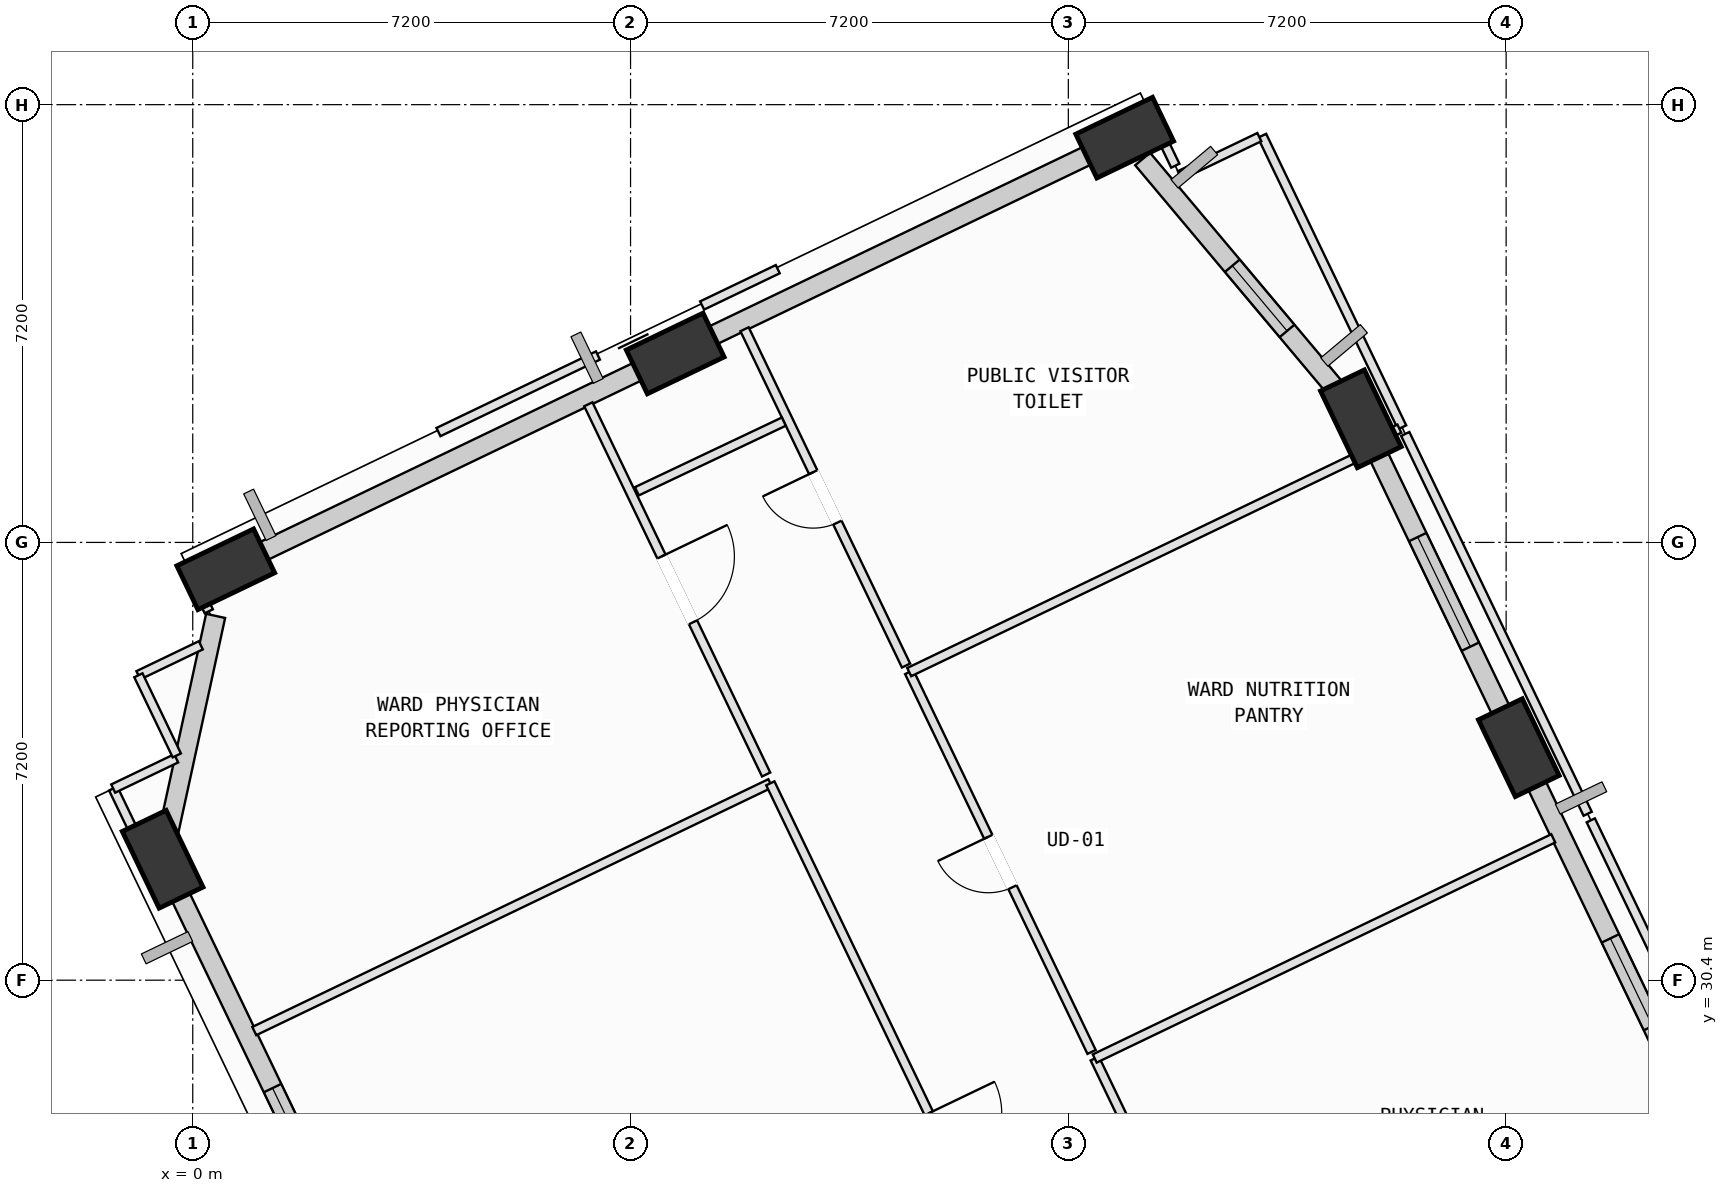
"""IFC4 building model, lengths in metres.
Left out: names, types, materials, properties, quantities, classifications, styles, units other than length and angle.
Written with IfcOpenShell. Run it as: python <this file> out.ifc"""

import sys

from ifc_helpers import new_model, si_unit, direction, frame, frame_2d, origin, origin_2d, place, context, subcontext, project, spatial, rectangle, extrude, element, fill, save


model = new_model("IFC4")
c1 = context("Model", 3, precision=1e-05, world=origin(), true_north=direction((0.0, 1.0)))
c2 = subcontext(c1, "Body", "Model", "MODEL_VIEW")
j1 = project(units=[si_unit("LENGTHUNIT", "METRE"), si_unit("PLANEANGLEUNIT", "RADIAN")], contexts=[c1])
p1 = place(None, origin())
s1 = spatial("IfcSite", under=j1, at=p1, CompositionType="ELEMENT")
p2 = place(p1, origin())
s2 = spatial("IfcBuilding", under=s1, at=p2, CompositionType="ELEMENT")
p3 = place(p2, frame((0.0, 0.0, 132.4)))
s3 = spatial("IfcBuildingStorey", under=s2, at=p3, CompositionType="ELEMENT", Elevation=132.4)
p4 = place(p3, frame((21.808, 34.224, 0.002), z_axis=(-0.038595202301, -0.049082366275, 0.998048762176), x_axis=(0.215850292416, 0.974802805821, 0.056286241908)))
e1 = element("IfcColumn", 1, at=p4, inside=s3, PredefinedType="COLUMN", context=c2, shape_type="SweptSolid", body=[
    extrude(rectangle(XDim=1.4, YDim=0.8, at=origin_2d()), origin(), (0.0, 0.0, 1.0), 4.004),
])
p5 = place(p3, frame((19.211, 39.633, 0.002), z_axis=(-0.060746648764, -0.059894491367, 0.996354602824), x_axis=(0.335654000459, 0.938841059949, 0.076901600308)))
e2 = element("IfcColumn", 2, at=p5, inside=s3, PredefinedType="COLUMN", context=c2, shape_type="SweptSolid", body=[
    extrude(rectangle(XDim=1.4, YDim=0.8, at=origin_2d()), origin(), (0.0, 0.0, 1.0), 4.011),
])
p6 = place(p3, frame((15.326, 44.257, 0.002), z_axis=(-0.079483443624, -0.075961640928, 0.99393773009), x_axis=(0.933868017477, -0.354436922656, 0.047591950922)))
e3 = element("IfcColumn", 3, at=p6, inside=s3, PredefinedType="COLUMN", context=c2, shape_type="SweptSolid", body=[
    extrude(rectangle(XDim=1.4, YDim=0.8, at=origin_2d()), origin(), (0.0, 0.0, 1.0), 4.021),
])
p7 = place(p3, frame((7.935, 40.708, 0.002), z_axis=(-0.064557977636, -0.106141801729, 0.992253085382), x_axis=(0.993383828706, -0.101472169552, 0.053777018064)))
e4 = element("IfcColumn", 4, at=p7, inside=s3, PredefinedType="COLUMN", context=c2, shape_type="SweptSolid", body=[
    extrude(rectangle(XDim=1.4, YDim=0.8, at=origin_2d()), origin(), (0.0, 0.0, 1.0), 4.028),
])
p8 = place(p3, frame((0.543, 37.158, 0.002), z_axis=(-0.049567049354, -0.136007147619, 0.98946711083), x_axis=(0.993621795809, 0.093750933041, 0.06266170639)))
e5 = element("IfcColumn", 5, at=p8, inside=s3, PredefinedType="COLUMN", context=c2, shape_type="SweptSolid", body=[
    extrude(rectangle(XDim=1.4, YDim=0.8, at=origin_2d()), origin(), (0.0, 0.0, 1.0), 4.039),
])
p9 = place(p3, frame((-0.495, 32.389, 0.002), z_axis=(-0.029927956764, -0.14014748238, 0.989678230834), x_axis=(-0.237013372869, 0.962878942205, 0.129185152939)))
e6 = element("IfcColumn", 6, at=p9, inside=s3, PredefinedType="COLUMN", context=c2, shape_type="SweptSolid", body=[
    extrude(rectangle(XDim=1.4, YDim=0.8, at=origin_2d()), origin(), (0.0, 0.0, 1.0), 4.038),
])
p10 = place(p3, frame((22.042, 33.739, 0.0), z_axis=(0.0, 0.0, 1.0), x_axis=(0.432859884789, -0.901461213886, 0.0)))
e7 = element("IfcWall", 7, at=p10, inside=s3, PredefinedType="SOLIDWALL", context=c2, shape_type="SweptSolid", body=[
    extrude(rectangle(XDim=6.223, YDim=0.32, at=frame_2d((3.111, 0.0))), origin(), (0.0, 0.0, 1.0), 3.165),
])
p11 = place(p10, frame((2.941, 0.0, 0.75)))
e8 = element("IfcOpeningElement", 8, at=p11, cuts=e7, PredefinedType="OPENING", context=c2, shape_type="SweptSolid", body=[
    extrude(rectangle(XDim=1.6, YDim=1.95, at=frame_2d((0.8, 0.975))), frame((0.0, 0.17, 0.0), z_axis=(0.0, -1.0, 0.0), x_axis=(1.0, 0.0, 0.0)), (0.0, 0.0, 1.0), 0.34),
])
p12 = place(p3, frame((19.438, 39.16, 0.0), z_axis=(0.0, 0.0, 1.0), x_axis=(0.432877308879, -0.901452847052, 0.0)))
e9 = element("IfcWall", 9, at=p12, inside=s3, PredefinedType="SOLIDWALL", context=c2, shape_type="SweptSolid", body=[
    extrude(rectangle(XDim=5.047, YDim=0.32, at=frame_2d((2.523, 0.0))), origin(), (0.0, 0.0, 1.0), 3.165),
])
p13 = place(p12, frame((1.633, 0.0, 0.75)))
e10 = element("IfcOpeningElement", 10, at=p13, cuts=e9, PredefinedType="OPENING", context=c2, shape_type="SweptSolid", body=[
    extrude(rectangle(XDim=2.0, YDim=1.95, at=frame_2d((1.0, 0.975))), frame((0.0, 0.17, 0.0), z_axis=(0.0, -1.0, 0.0), x_axis=(1.0, 0.0, 0.0)), (0.0, 0.0, 1.0), 0.34),
])
p14 = place(p3, frame((15.622, 43.906, 0.0), z_axis=(0.0, 0.0, 1.0), x_axis=(0.64320883209, -0.765690798117, 0.0)))
e11 = element("IfcWall", 11, at=p14, inside=s3, PredefinedType="SOLIDWALL", context=c2, shape_type="SweptSolid", body=[
    extrude(rectangle(XDim=5.129, YDim=0.32, at=frame_2d((2.564, 0.0))), origin(), (0.0, 0.0, 1.0), 3.165),
])
p15 = place(p14, frame((2.293, 0.0, 0.75)))
e12 = element("IfcOpeningElement", 12, at=p15, cuts=e11, PredefinedType="OPENING", context=c2, shape_type="SweptSolid", body=[
    extrude(rectangle(XDim=1.4, YDim=1.85, at=frame_2d((0.7, 0.925))), frame((0.0, 0.17, 0.0), z_axis=(0.0, -1.0, 0.0), x_axis=(1.0, 0.0, 0.0)), (0.0, 0.0, 1.0), 0.34),
])
p16 = place(p3, frame((8.176, 40.823, 0.0), z_axis=(0.0, 0.0, 1.0), x_axis=(0.901450863986, 0.432881438524, 0.0)))
e13 = element("IfcWall", 13, at=p16, inside=s3, PredefinedType="SOLIDWALL", context=c2, shape_type="SweptSolid", body=[
    extrude(rectangle(XDim=7.231, YDim=0.32, at=frame_2d((3.615, 0.0))), origin(), (0.0, 0.0, 1.0), 3.165),
])
p17 = place(p3, frame((0.762, 37.263, 0.0), z_axis=(0.0, 0.0, 1.0), x_axis=(0.901459116329, 0.432864253072, 0.0)))
e14 = element("IfcWall", 14, at=p17, inside=s3, PredefinedType="SOLIDWALL", context=c2, shape_type="SweptSolid", body=[
    extrude(rectangle(XDim=7.27, YDim=0.32, at=frame_2d((3.635, 0.0))), origin(), (0.0, 0.0, 1.0), 3.165),
])
p18 = place(p3, frame((-0.451, 32.591, 0.0), z_axis=(0.0, 0.0, 1.0), x_axis=(0.212661566616, 0.977125917211, 0.0)))
e15 = element("IfcWall", 15, at=p18, inside=s3, PredefinedType="SOLIDWALL", context=c2, shape_type="SweptSolid", body=[
    extrude(rectangle(XDim=3.889, YDim=0.32, at=frame_2d((1.945, 0.0))), origin(), (0.0, 0.0, 1.0), 3.165),
])
p19 = place(p3, frame((2.167, 26.847, 0.0), z_axis=(0.0, 0.0, 1.0), x_axis=(-0.432891082479, 0.901446232845, 0.0)))
e16 = element("IfcWall", 16, at=p19, inside=s3, PredefinedType="SOLIDWALL", context=c2, shape_type="SweptSolid", body=[
    extrude(rectangle(XDim=5.456, YDim=0.32, at=frame_2d((2.728, 0.0))), origin(), (0.0, 0.0, 1.0), 3.165),
])
p20 = place(p19, frame((0.773, 0.0, 0.75)))
e17 = element("IfcOpeningElement", 17, at=p20, cuts=e16, PredefinedType="OPENING", context=c2, shape_type="SweptSolid", body=[
    extrude(rectangle(XDim=1.2, YDim=1.75, at=frame_2d((0.6, 0.875))), frame((0.0, 0.17, 0.0), z_axis=(0.0, -1.0, 0.0), x_axis=(1.0, 0.0, 0.0)), (0.0, 0.0, 1.0), 0.34),
])
p21 = place(p3, frame((1.012, 29.563, 0.0), z_axis=(0.0, 0.0, 1.0), x_axis=(0.901474897233, 0.432831387099, 0.0)))
e18 = element("IfcWall", 18, at=p21, inside=s3, PredefinedType="PARTITIONING", context=c2, shape_type="SweptSolid", body=[
    extrude(rectangle(XDim=9.415, YDim=0.15, at=frame_2d((4.707, 0.0))), origin(), (0.0, 0.0, 1.0), 3.78),
])
p22 = place(p3, frame((9.499, 33.638, 0.0), z_axis=(0.0, 0.0, 1.0), x_axis=(0.432861750003, -0.901460318253, 0.0)))
e19 = element("IfcWall", 19, at=p22, inside=s3, PredefinedType="PARTITIONING", context=c2, shape_type="SweptSolid", body=[
    extrude(rectangle(XDim=13.24, YDim=0.15, at=frame_2d((6.62, 0.0))), origin(), (0.0, 0.0, 1.0), 2.965),
])
p23 = place(p22, frame((6.02, 0.0, 0.0)))
e20 = element("IfcOpeningElement", 20, at=p23, cuts=e19, PredefinedType="OPENING", context=c2, shape_type="SweptSolid", body=[
    extrude(rectangle(XDim=1.2, YDim=2.15, at=frame_2d((0.6, 1.075))), frame((0.0, 0.085, 0.0), z_axis=(0.0, -1.0, 0.0), x_axis=(1.0, 0.0, 0.0)), (0.0, 0.0, 1.0), 0.17),
])
p24 = place(p3, frame((-0.894, 35.415, 0.0), z_axis=(0.0, 0.0, 1.0), x_axis=(0.901553151805, 0.432668365461, 0.0)))
e21 = element("IfcWall", 21, at=p24, inside=s3, PredefinedType="PARTITIONING", context=c2, shape_type="SweptSolid", body=[
    extrude(rectangle(XDim=1.139, YDim=0.15, at=frame_2d((0.57, 0.0))), origin(), (0.0, 0.0, 1.0), 3.78),
])
p25 = place(p3, frame((0.264, 36.467, 0.0), z_axis=(0.0, 0.0, 1.0), x_axis=(-0.432919972464, 0.901432358772, 0.0)))
e22 = element("IfcWall", 22, at=p25, inside=s3, PredefinedType="PARTITIONING", context=c2, shape_type="SweptSolid", body=[
    extrude(rectangle(XDim=0.672, YDim=0.15, at=frame_2d((0.336, 0.0))), origin(), (0.0, 0.0, 1.0), 2.965),
])
p26 = place(p3, frame((-0.027, 37.073, 0.0), z_axis=(0.0, 0.0, 1.0), x_axis=(0.901633510565, 0.432500881647, 0.0)))
e23 = element("IfcWall", 23, at=p26, inside=s3, PredefinedType="PARTITIONING", context=c2, shape_type="SweptSolid", body=[
    extrude(rectangle(XDim=0.793, YDim=0.15, at=frame_2d((0.396, 0.0))), origin(), (0.0, 0.0, 1.0), 3.78),
])
p27 = place(p3, frame((6.506, 39.872, 0.0), z_axis=(0.0, 0.0, 1.0), x_axis=(0.432857966053, -0.901462135214, 0.0)))
e24 = element("IfcWall", 24, at=p27, inside=s3, PredefinedType="PARTITIONING", context=c2, shape_type="SweptSolid", body=[
    extrude(rectangle(XDim=6.755, YDim=0.15, at=frame_2d((3.377, 0.0))), origin(), (0.0, 0.0, 1.0), 2.965),
])
p28 = place(p27, frame((2.777, 0.0, 0.0)))
e25 = element("IfcOpeningElement", 25, at=p28, cuts=e24, PredefinedType="OPENING", context=c2, shape_type="SweptSolid", body=[
    extrude(rectangle(XDim=1.2, YDim=2.15, at=frame_2d((0.6, 1.075))), frame((0.0, 0.085, 0.0), z_axis=(0.0, -1.0, 0.0), x_axis=(1.0, 0.0, 0.0)), (0.0, 0.0, 1.0), 0.17),
])
p29 = place(p3, frame((-0.402, 31.665, 0.0), z_axis=(0.0, 0.0, 1.0), x_axis=(-0.432833442947, 0.901473910142, 0.0)))
e26 = element("IfcWall", 26, at=p29, inside=s3, PredefinedType="PARTITIONING", context=c2, shape_type="SweptSolid", body=[
    extrude(rectangle(XDim=2.093, YDim=0.15, at=frame_2d((1.047, 0.0))), origin(), (0.0, 0.0, 1.0), 3.165),
])
p30 = place(p3, frame((-1.308, 33.552, 0.0), z_axis=(0.0, 0.0, 1.0), x_axis=(0.901615860476, 0.432537674819, 0.0)))
e27 = element("IfcWall", 27, at=p30, inside=s3, PredefinedType="PARTITIONING", context=c2, shape_type="SweptSolid", body=[
    extrude(rectangle(XDim=1.149, YDim=0.15, at=frame_2d((0.575, 0.0))), origin(), (0.0, 0.0, 1.0), 3.78),
])
p31 = place(p3, frame((-0.262, 34.097, 0.0), z_axis=(0.0, 0.0, 1.0), x_axis=(-0.432388980773, 0.901687179295, 0.0)))
e28 = element("IfcWall", 28, at=p31, inside=s3, PredefinedType="PARTITIONING", context=c2, shape_type="SweptSolid", body=[
    extrude(rectangle(XDim=1.462, YDim=0.15, at=frame_2d((0.731, 0.0))), origin(), (0.0, 0.0, 1.0), 3.78),
])
p32 = place(p3, frame((18.931, 20.58, 0.0), z_axis=(0.0, 0.0, 1.0), x_axis=(-0.43286607563, 0.901458241168, 0.0)))
e29 = element("IfcWall", 29, at=p32, inside=s3, PredefinedType="PARTITIONING", context=c2, shape_type="SweptSolid", body=[
    extrude(rectangle(XDim=9.465, YDim=0.15, at=frame_2d((4.732, 0.0))), origin(), (0.0, 0.0, 1.0), 3.78),
])
p33 = place(p32, frame((4.132, 0.0, 0.0)))
e30 = element("IfcOpeningElement", 30, at=p33, cuts=e29, PredefinedType="OPENING", context=c2, shape_type="SweptSolid", body=[
    extrude(rectangle(XDim=1.2, YDim=2.15, at=frame_2d((0.6, 1.075))), frame((0.0, 0.085, 0.0), z_axis=(0.0, -1.0, 0.0), x_axis=(1.0, 0.0, 0.0)), (0.0, 0.0, 1.0), 0.17),
])
p34 = place(p3, frame((14.834, 29.112, 0.0), z_axis=(0.0, 0.0, 1.0), x_axis=(0.901468854951, 0.432843971373, 0.0)))
e31 = element("IfcWall", 31, at=p34, inside=s3, PredefinedType="PARTITIONING", context=c2, shape_type="SweptSolid", body=[
    extrude(rectangle(XDim=8.365, YDim=0.15, at=frame_2d((4.183, 0.0))), origin(), (0.0, 0.0, 1.0), 3.78),
])
p35 = place(p3, frame((22.992, 33.029, 0.0), z_axis=(0.0, 0.0, 1.0), x_axis=(0.432914217611, -0.901435122563, 0.0)))
e32 = element("IfcWall", 32, at=p35, inside=s3, PredefinedType="PARTITIONING", context=c2, shape_type="SweptSolid", body=[
    extrude(rectangle(XDim=9.75, YDim=0.15, at=frame_2d((4.875, 0.0))), origin(), (0.0, 0.0, 1.0), 3.78),
])
p36 = place(p3, frame((14.782, 29.22, 0.0), z_axis=(0.0, 0.0, 1.0), x_axis=(-0.432781462807, 0.901498866029, 0.0)))
e33 = element("IfcWall", 33, at=p36, inside=s3, PredefinedType="PARTITIONING", context=c2, shape_type="SweptSolid", body=[
    extrude(rectangle(XDim=6.93, YDim=0.15, at=frame_2d((3.465, 0.0))), origin(), (0.0, 0.0, 1.0), 3.78),
])
p37 = place(p36, frame((3.005, 0.0, 0.0)))
e34 = element("IfcOpeningElement", 34, at=p37, cuts=e33, PredefinedType="OPENING", context=c2, shape_type="SweptSolid", body=[
    extrude(rectangle(XDim=0.92, YDim=2.1, at=frame_2d((0.46, 1.05))), frame((0.0, 0.085, 0.0), z_axis=(0.0, -1.0, 0.0), x_axis=(1.0, 0.0, 0.0)), (0.0, 0.0, 1.0), 0.17),
])
p38 = place(p3, frame((11.783, 35.467, 0.0), z_axis=(0.0, 0.0, 1.0), x_axis=(0.901492537069, 0.432794646002, 0.0)))
e35 = element("IfcWall", 35, at=p38, inside=s3, PredefinedType="PARTITIONING", context=c2, shape_type="SweptSolid", body=[
    extrude(rectangle(XDim=8.364, YDim=0.15, at=frame_2d((4.182, 0.0))), origin(), (0.0, 0.0, 1.0), 3.78),
])
p39 = place(p3, frame((19.941, 39.384, 0.0), z_axis=(0.0, 0.0, 1.0), x_axis=(0.432895982314, -0.901443879838, 0.0)))
e36 = element("IfcWall", 36, at=p39, inside=s3, PredefinedType="PARTITIONING", context=c2, shape_type="SweptSolid", body=[
    extrude(rectangle(XDim=6.93, YDim=0.15, at=frame_2d((3.465, 0.0))), origin(), (0.0, 0.0, 1.0), 3.78),
])
p40 = place(p3, frame((17.586, 44.288, 0.0), z_axis=(0.0, 0.0, 1.0), x_axis=(0.432929498671, -0.901427783674, 0.0)))
e37 = element("IfcWall", 37, at=p40, inside=s3, PredefinedType="PARTITIONING", context=c2, shape_type="SweptSolid", body=[
    extrude(rectangle(XDim=5.32, YDim=0.15, at=frame_2d((2.66, 0.0))), origin(), (0.0, 0.0, 1.0), 3.78),
])
p41 = place(p3, frame((19.844, 39.471, 0.0), z_axis=(0.0, 0.0, 1.0), x_axis=(-0.902501800541, -0.430686080597, 0.0)))
e38 = element("IfcWall", 38, at=p41, inside=s3, PredefinedType="PARTITIONING", context=c2, shape_type="SweptSolid", body=[
    extrude(rectangle(XDim=0.416, YDim=0.15, at=frame_2d((0.208, 0.0))), origin(), (0.0, 0.0, 1.0), 3.78),
])
p42 = place(p3, frame((11.731, 35.575, 0.0), z_axis=(0.0, 0.0, 1.0), x_axis=(-0.432879822963, 0.901451639785, 0.0)))
e39 = element("IfcWall", 39, at=p42, inside=s3, PredefinedType="PARTITIONING", context=c2, shape_type="SweptSolid", body=[
    extrude(rectangle(XDim=6.136, YDim=0.15, at=frame_2d((3.068, 0.0))), origin(), (0.0, 0.0, 1.0), 3.78),
])
p43 = place(p42, frame((2.608, 0.0, 0.0)))
e40 = element("IfcOpeningElement", 40, at=p43, cuts=e39, PredefinedType="OPENING", context=c2, shape_type="SweptSolid", body=[
    extrude(rectangle(XDim=0.92, YDim=2.1, at=frame_2d((0.46, 1.05))), frame((0.0, 0.085, 0.0), z_axis=(0.0, -1.0, 0.0), x_axis=(1.0, 0.0, 0.0)), (0.0, 0.0, 1.0), 0.17),
])
p44 = place(p3, frame((14.612, 44.125, 0.0), z_axis=(0.0, 0.0, 1.0), x_axis=(0.901340313144, 0.433111579043, 0.0)))
e41 = element("IfcWall", 41, at=p44, inside=s3, PredefinedType="PARTITIONING", context=c2, shape_type="SweptSolid", body=[
    extrude(rectangle(XDim=1.251, YDim=0.15, at=frame_2d((0.626, 0.0))), origin(), (0.0, 0.0, 1.0), 3.165),
])
p45 = place(p3, frame((15.762, 44.622, 0.0), z_axis=(0.0, 0.0, 1.0), x_axis=(0.433094717302, -0.901348415345, 0.0)))
e42 = element("IfcWall", 42, at=p45, inside=s3, PredefinedType="PARTITIONING", context=c2, shape_type="SweptSolid", body=[
    extrude(rectangle(XDim=0.917, YDim=0.15, at=frame_2d((0.458, 0.0))), origin(), (0.0, 0.0, 1.0), 3.78),
])
p46 = place(p3, frame((16.234, 43.639, 0.0), z_axis=(0.0, 0.0, 1.0), x_axis=(0.901583486709, 0.432605150795, 0.0)))
e43 = element("IfcWall", 43, at=p46, inside=s3, PredefinedType="PARTITIONING", context=c2, shape_type="SweptSolid", body=[
    extrude(rectangle(XDim=1.45, YDim=0.15, at=frame_2d((0.725, 0.0))), origin(), (0.0, 0.0, 1.0), 3.78),
])
p47 = place(p3, frame((9.721, 39.587, 0.0), z_axis=(0.0, 0.0, 1.0), x_axis=(-0.903577949285, -0.428423726661, 0.0)))
e44 = element("IfcWall", 44, at=p47, inside=s3, PredefinedType="PARTITIONING", context=c2, shape_type="SweptSolid", body=[
    extrude(rectangle(XDim=2.675, YDim=0.15, at=frame_2d((1.337, 0.0))), origin(), (0.0, 0.0, 1.0), 3.78),
])
p48 = place(p3, frame((4.041, 39.415, 0.0), z_axis=(0.0, 0.0, 1.0), x_axis=(0.901526985589, 0.432722883905, 0.0)))
e45 = element("IfcWall", 45, at=p48, inside=s3, PredefinedType="PARTITIONING", context=c2, shape_type="SweptSolid", body=[
    extrude(rectangle(XDim=2.91, YDim=0.15, at=frame_2d((1.455, 0.0))), origin(), (0.0, 0.0, 1.0), 3.78),
])
p49 = place(p3, frame((8.377, 41.497, 0.0), z_axis=(0.0, 0.0, 1.0), x_axis=(0.901597586256, 0.432575764991, 0.0)))
e46 = element("IfcWall", 46, at=p49, inside=s3, PredefinedType="PARTITIONING", context=c2, shape_type="SweptSolid", body=[
    extrude(rectangle(XDim=1.38, YDim=0.15, at=frame_2d((0.69, 0.0))), origin(), (0.0, 0.0, 1.0), 3.78),
])
p50 = place(p11, origin())
e47 = element("IfcWindow", 47, at=p50, inside=s3, PartitioningType="SINGLE_PANEL", PredefinedType="WINDOW", context=c2, shape_type="SweptSolid", body=[
    extrude(rectangle(XDim=1.6, YDim=1.95, at=frame_2d((0.8, 0.975))), frame((0.0, 0.03, 0.0), z_axis=(0.0, -1.0, 0.0), x_axis=(1.0, 0.0, 0.0)), (0.0, 0.0, 1.0), 0.06),
])
fill(e8, e47)
p51 = place(p13, origin())
e48 = element("IfcWindow", 48, at=p51, inside=s3, PartitioningType="SINGLE_PANEL", PredefinedType="WINDOW", context=c2, shape_type="SweptSolid", body=[
    extrude(rectangle(XDim=2.0, YDim=1.95, at=frame_2d((1.0, 0.975))), frame((0.0, 0.03, 0.0), z_axis=(0.0, -1.0, 0.0), x_axis=(1.0, 0.0, 0.0)), (0.0, 0.0, 1.0), 0.06),
])
fill(e10, e48)
p52 = place(p15, origin())
e49 = element("IfcWindow", 49, at=p52, inside=s3, PartitioningType="SINGLE_PANEL", PredefinedType="WINDOW", context=c2, shape_type="SweptSolid", body=[
    extrude(rectangle(XDim=1.4, YDim=1.85, at=frame_2d((0.7, 0.925))), frame((0.0, 0.03, 0.0), z_axis=(0.0, -1.0, 0.0), x_axis=(1.0, 0.0, 0.0)), (0.0, 0.0, 1.0), 0.06),
])
fill(e12, e49)
p53 = place(p20, origin())
e50 = element("IfcWindow", 50, at=p53, inside=s3, PartitioningType="SINGLE_PANEL", PredefinedType="WINDOW", context=c2, shape_type="SweptSolid", body=[
    extrude(rectangle(XDim=1.2, YDim=1.75, at=frame_2d((0.6, 0.875))), frame((0.0, 0.03, 0.0), z_axis=(0.0, -1.0, 0.0), x_axis=(1.0, 0.0, 0.0)), (0.0, 0.0, 1.0), 0.06),
])
fill(e17, e50)
p54 = place(p23, origin())
e51 = element("IfcDoor", 51, at=p54, inside=s3, OperationType="SINGLE_SWING_LEFT", PredefinedType="DOOR", context=c2, shape_type="SweptSolid", body=[
    extrude(rectangle(XDim=1.2, YDim=2.15, at=frame_2d((0.6, 1.075))), frame((0.0, 0.025, 0.0), z_axis=(0.0, -1.0, 0.0), x_axis=(1.0, 0.0, 0.0)), (0.0, 0.0, 1.0), 0.05),
])
fill(e20, e51)
p55 = place(p28, origin())
e52 = element("IfcDoor", 52, at=p55, inside=s3, OperationType="SINGLE_SWING_LEFT", PredefinedType="DOOR", context=c2, shape_type="SweptSolid", body=[
    extrude(rectangle(XDim=1.2, YDim=2.15, at=frame_2d((0.6, 1.075))), frame((0.0, 0.025, 0.0), z_axis=(0.0, -1.0, 0.0), x_axis=(1.0, 0.0, 0.0)), (0.0, 0.0, 1.0), 0.05),
])
fill(e25, e52)
p56 = place(p37, origin())
e53 = element("IfcDoor", 53, at=p56, inside=s3, OperationType="SINGLE_SWING_RIGHT", PredefinedType="DOOR", context=c2, shape_type="SweptSolid", body=[
    extrude(rectangle(XDim=0.92, YDim=2.1, at=frame_2d((0.46, 1.05))), frame((0.0, 0.025, 0.0), z_axis=(0.0, -1.0, 0.0), x_axis=(1.0, 0.0, 0.0)), (0.0, 0.0, 1.0), 0.05),
])
fill(e34, e53)
p57 = place(p43, origin())
e54 = element("IfcDoor", 54, at=p57, inside=s3, OperationType="SINGLE_SWING_RIGHT", PredefinedType="DOOR", context=c2, shape_type="SweptSolid", body=[
    extrude(rectangle(XDim=0.92, YDim=2.1, at=frame_2d((0.46, 1.05))), frame((0.0, 0.025, 0.0), z_axis=(0.0, -1.0, 0.0), x_axis=(1.0, 0.0, 0.0)), (0.0, 0.0, 1.0), 0.05),
])
fill(e40, e54)
save(model, sys.argv[1])
